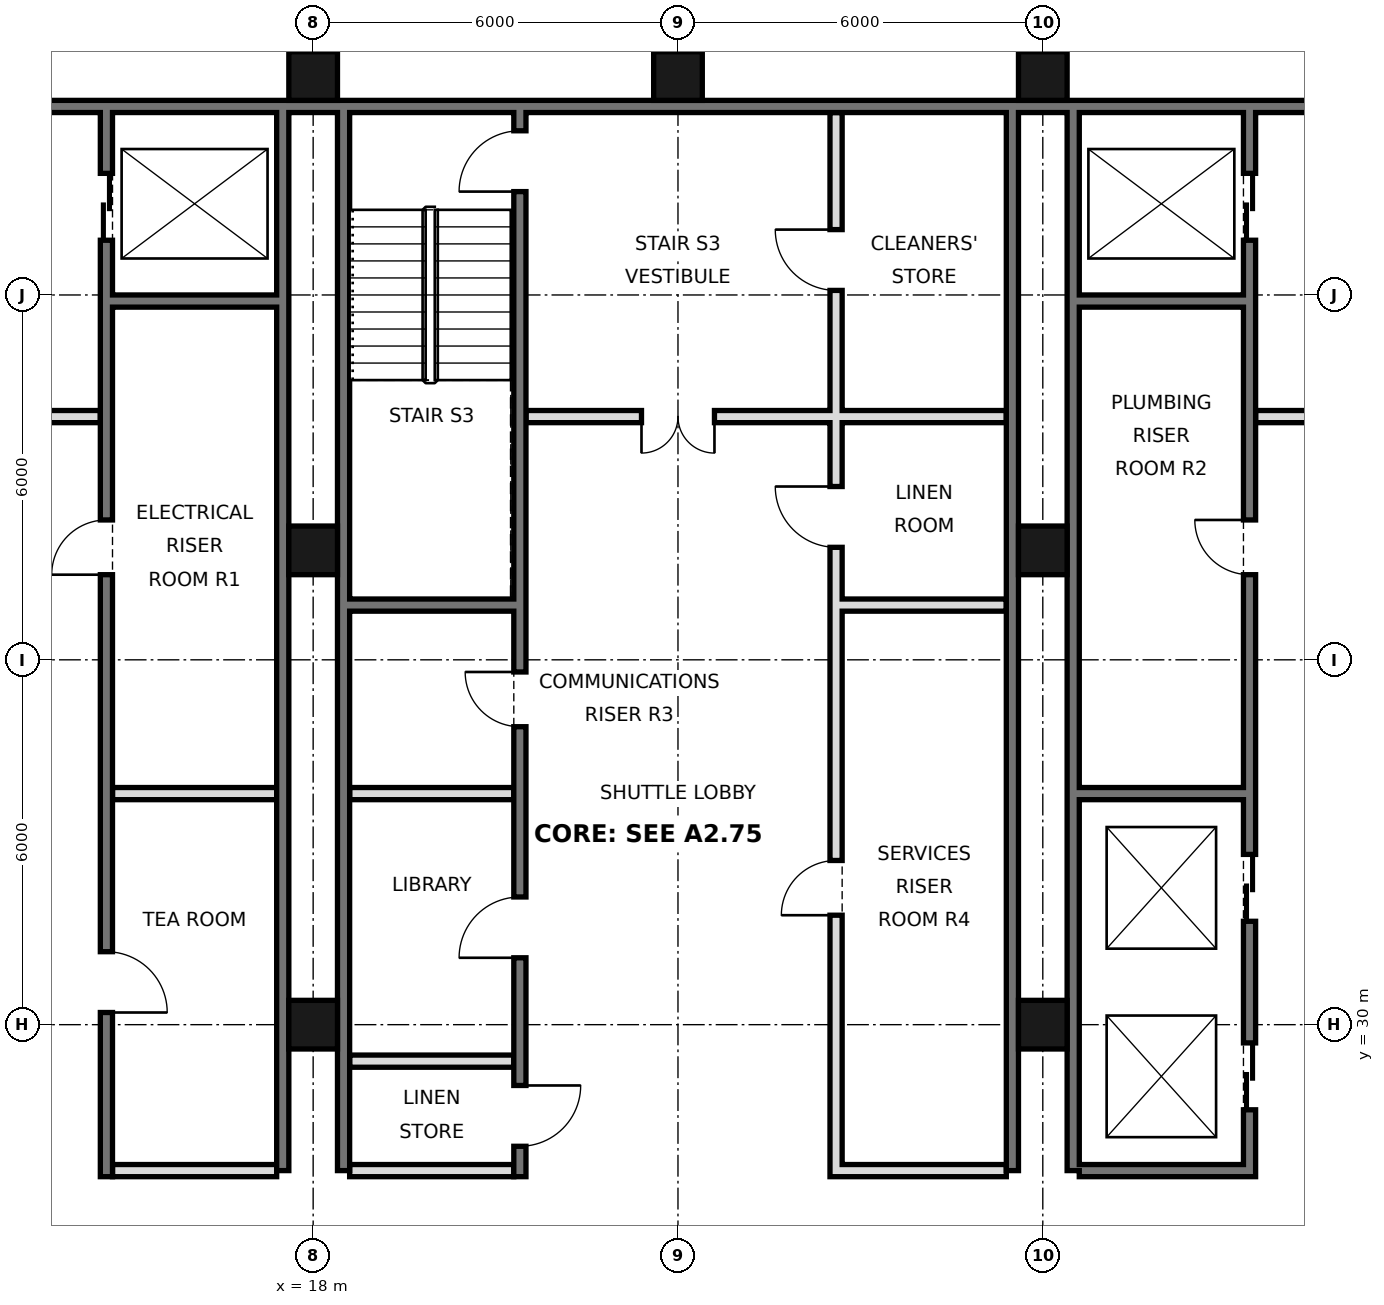
"""IFC4 building model, lengths in metres.
Left out: names, types, materials, properties, quantities, classifications, styles, units other than length and angle.
Written with IfcOpenShell. Run it as: python <this file> out.ifc"""

import sys

from ifc_helpers import new_model, si_unit, direction, frame, frame_2d, origin, origin_2d, place, context, subcontext, project, spatial, rectangle, hollow_rectangle, extrude, element, fill, save


model = new_model("IFC4")
c1 = context("Model", 3, precision=1e-05, world=origin(), true_north=direction((0.0, 1.0)))
c2 = subcontext(c1, "Body", "Model", "MODEL_VIEW")
j1 = project(units=[si_unit("LENGTHUNIT", "METRE"), si_unit("PLANEANGLEUNIT", "RADIAN")], contexts=[c1])
p1 = place(None, origin())
s1 = spatial("IfcSite", under=j1, at=p1, CompositionType="ELEMENT")
p2 = place(p1, origin())
s2 = spatial("IfcBuilding", under=s1, at=p2, CompositionType="ELEMENT")
p3 = place(p2, frame((0.0, 0.0, 301.6)))
s3 = spatial("IfcBuildingStorey", under=s2, at=p3, CompositionType="ELEMENT", Elevation=301.6)
for number, where, z_axis, x_axis in (
    (1, (18.0, 30.0, 0.0), (0.0, 0.0, 1.0), (1.0, 0.0, 0.0)),
    (2, (18.0, 37.8, 0.0), (0.0, 0.0, 1.0), (1.0, 0.0, 0.0)),
    (3, (18.0, 45.6, 0.0), (0.0, 0.0, 1.0), (1.0, 0.0, 0.0)),
    (4, (24.0, 45.6, 0.0), (0.0, 0.0, 1.0), (1.0, 0.0, 0.0)),
    (5, (30.0, 30.0, 0.0), (0.0, 0.0, 1.0), (1.0, 0.0, 0.0)),
    (6, (30.0, 37.8, 0.0), (0.0, 0.0, 1.0), (1.0, 0.0, 0.0)),
    (7, (30.0, 45.6, 0.0), (0.0, 0.0, 1.0), (1.0, 0.0, 0.0)),
):
    element("IfcColumn", number, at=place(p3, frame(where, z_axis=z_axis, x_axis=x_axis)), inside=s3, PredefinedType="COLUMN", context=c2, shape_type="SweptSolid", body=[
        extrude(hollow_rectangle(XDim=0.8, YDim=0.8, WallThickness=0.025, at=origin_2d()), origin(), (0.0, 0.0, 1.0), 3.6),
    ])
p4 = place(p3, frame((6.6, 45.1, 0.0), z_axis=(0.0, 0.0, 1.0), x_axis=(1.0, 0.0, 0.0)))
e8 = element("IfcWall", 8, at=p4, inside=s3, PredefinedType="SOLIDWALL", context=c2, shape_type="SweptSolid", body=[
    extrude(rectangle(XDim=34.8, YDim=0.2, at=frame_2d((17.4, 0.0))), origin(), (0.0, 0.0, 1.0), 3.42),
])
for number, where, z_axis, x_axis in (
    (9, (17.5, 27.6, 0.0), (0.0, 0.0, 1.0), (0.0, 1.0, 0.0)),
    (10, (18.5, 27.6, 0.0), (0.0, 0.0, 1.0), (0.0, 1.0, 0.0)),
    (11, (29.5, 27.6, 0.0), (0.0, 0.0, 1.0), (0.0, 1.0, 0.0)),
    (12, (30.5, 27.6, 0.0), (0.0, 0.0, 1.0), (0.0, 1.0, 0.0)),
):
    element("IfcWall", number, at=place(p3, frame(where, z_axis=z_axis, x_axis=x_axis)), inside=s3, PredefinedType="SOLIDWALL", context=c2, shape_type="SweptSolid", body=[
        extrude(rectangle(XDim=17.5, YDim=0.2, at=frame_2d((8.75, 0.0))), origin(), (0.0, 0.0, 1.0), 3.42),
    ])
p5 = place(p3, frame((14.6, 27.5, 0.0), z_axis=(0.0, 0.0, 1.0), x_axis=(0.0, 1.0, 0.0)))
e13 = element("IfcWall", 13, at=p5, inside=s3, PredefinedType="SOLIDWALL", context=c2, shape_type="SweptSolid", body=[
    extrude(rectangle(XDim=17.5, YDim=0.2, at=frame_2d((8.75, 0.0))), origin(), (0.0, 0.0, 1.0), 3.42),
])
p6 = place(p5, frame((15.4, 0.0, 0.0)))
e14 = element("IfcOpeningElement", 14, at=p6, cuts=e13, PredefinedType="OPENING", context=c2, shape_type="SweptSolid", body=[
    extrude(rectangle(XDim=1.1, YDim=2.1, at=frame_2d((0.55, 1.05))), frame((0.0, 0.11, 0.0), z_axis=(0.0, -1.0, 0.0), x_axis=(1.0, 0.0, 0.0)), (0.0, 0.0, 1.0), 0.22),
])
p7 = place(p5, frame((2.7, 0.0, 0.0)))
e15 = element("IfcOpeningElement", 15, at=p7, cuts=e13, PredefinedType="OPENING", context=c2, shape_type="SweptSolid", body=[
    extrude(rectangle(XDim=1.0, YDim=2.1, at=frame_2d((0.5, 1.05))), frame((0.0, 0.11, 0.0), z_axis=(0.0, -1.0, 0.0), x_axis=(1.0, 0.0, 0.0)), (0.0, 0.0, 1.0), 0.22),
])
p8 = place(p5, frame((9.9, 0.0, 0.0)))
e16 = element("IfcOpeningElement", 16, at=p8, cuts=e13, PredefinedType="OPENING", context=c2, shape_type="SweptSolid", body=[
    extrude(rectangle(XDim=0.9, YDim=2.1, at=frame_2d((0.45, 1.05))), frame((0.0, 0.11, 0.0), z_axis=(0.0, -1.0, 0.0), x_axis=(1.0, 0.0, 0.0)), (0.0, 0.0, 1.0), 0.22),
])
p9 = place(p3, frame((21.4, 27.5, 0.0), z_axis=(0.0, 0.0, 1.0), x_axis=(0.0, 1.0, 0.0)))
e17 = element("IfcWall", 17, at=p9, inside=s3, PredefinedType="SOLIDWALL", context=c2, shape_type="SweptSolid", body=[
    extrude(rectangle(XDim=17.5, YDim=0.2, at=frame_2d((8.75, 0.0))), origin(), (0.0, 0.0, 1.0), 3.42),
])
p10 = place(p9, frame((0.5, 0.0, 0.0)))
e18 = element("IfcOpeningElement", 18, at=p10, cuts=e17, PredefinedType="OPENING", context=c2, shape_type="SweptSolid", body=[
    extrude(rectangle(XDim=1.0, YDim=2.1, at=frame_2d((0.5, 1.05))), frame((0.0, 0.11, 0.0), z_axis=(0.0, -1.0, 0.0), x_axis=(1.0, 0.0, 0.0)), (0.0, 0.0, 1.0), 0.22),
])
p11 = place(p9, frame((3.6, 0.0, 0.0)))
e19 = element("IfcOpeningElement", 19, at=p11, cuts=e17, PredefinedType="OPENING", context=c2, shape_type="SweptSolid", body=[
    extrude(rectangle(XDim=1.0, YDim=2.1, at=frame_2d((0.5, 1.05))), frame((0.0, 0.11, 0.0), z_axis=(0.0, -1.0, 0.0), x_axis=(1.0, 0.0, 0.0)), (0.0, 0.0, 1.0), 0.22),
])
p12 = place(p9, frame((16.2, 0.0, 0.0)))
e20 = element("IfcOpeningElement", 20, at=p12, cuts=e17, PredefinedType="OPENING", context=c2, shape_type="SweptSolid", body=[
    extrude(rectangle(XDim=1.0, YDim=2.1, at=frame_2d((0.5, 1.05))), frame((0.0, 0.11, 0.0), z_axis=(0.0, -1.0, 0.0), x_axis=(1.0, 0.0, 0.0)), (0.0, 0.0, 1.0), 0.22),
])
p13 = place(p9, frame((7.4, 0.0, 0.0)))
e21 = element("IfcOpeningElement", 21, at=p13, cuts=e17, PredefinedType="OPENING", context=c2, shape_type="SweptSolid", body=[
    extrude(rectangle(XDim=0.9, YDim=2.1, at=frame_2d((0.45, 1.05))), frame((0.0, 0.11, 0.0), z_axis=(0.0, -1.0, 0.0), x_axis=(1.0, 0.0, 0.0)), (0.0, 0.0, 1.0), 0.22),
])
p14 = place(p3, frame((26.6, 27.5, 0.0), z_axis=(0.0, 0.0, 1.0), x_axis=(0.0, 1.0, 0.0)))
e22 = element("IfcWall", 22, at=p14, inside=s3, PredefinedType="SOLIDWALL", context=c2, shape_type="SweptSolid", body=[
    extrude(rectangle(XDim=17.5, YDim=0.2, at=frame_2d((8.75, 0.0))), origin(), (0.0, 0.0, 1.0), 3.42),
])
p15 = place(p14, frame((4.3, 0.0, 0.0)))
e23 = element("IfcOpeningElement", 23, at=p15, cuts=e22, PredefinedType="OPENING", context=c2, shape_type="SweptSolid", body=[
    extrude(rectangle(XDim=0.9, YDim=2.1, at=frame_2d((0.45, 1.05))), frame((0.0, 0.11, 0.0), z_axis=(0.0, -1.0, 0.0), x_axis=(1.0, 0.0, 0.0)), (0.0, 0.0, 1.0), 0.22),
])
p16 = place(p14, frame((10.35, 0.0, 0.0)))
e24 = element("IfcOpeningElement", 24, at=p16, cuts=e22, PredefinedType="OPENING", context=c2, shape_type="SweptSolid", body=[
    extrude(rectangle(XDim=1.0, YDim=2.1, at=frame_2d((0.5, 1.05))), frame((0.0, 0.11, 0.0), z_axis=(0.0, -1.0, 0.0), x_axis=(1.0, 0.0, 0.0)), (0.0, 0.0, 1.0), 0.22),
])
p17 = place(p14, frame((14.575, 0.0, 0.0)))
e25 = element("IfcOpeningElement", 25, at=p17, cuts=e22, PredefinedType="OPENING", context=c2, shape_type="SweptSolid", body=[
    extrude(rectangle(XDim=1.0, YDim=2.1, at=frame_2d((0.5, 1.05))), frame((0.0, 0.11, 0.0), z_axis=(0.0, -1.0, 0.0), x_axis=(1.0, 0.0, 0.0)), (0.0, 0.0, 1.0), 0.22),
])
p18 = place(p3, frame((33.4, 27.5, 0.0), z_axis=(0.0, 0.0, 1.0), x_axis=(0.0, 1.0, 0.0)))
e26 = element("IfcWall", 26, at=p18, inside=s3, PredefinedType="SOLIDWALL", context=c2, shape_type="SweptSolid", body=[
    extrude(rectangle(XDim=17.5, YDim=0.2, at=frame_2d((8.75, 0.0))), origin(), (0.0, 0.0, 1.0), 3.42),
])
p19 = place(p18, frame((1.1, 0.0, 0.0)))
e27 = element("IfcOpeningElement", 27, at=p19, cuts=e26, PredefinedType="OPENING", context=c2, shape_type="SweptSolid", body=[
    extrude(rectangle(XDim=1.1, YDim=2.1, at=frame_2d((0.55, 1.05))), frame((0.0, 0.11, 0.0), z_axis=(0.0, -1.0, 0.0), x_axis=(1.0, 0.0, 0.0)), (0.0, 0.0, 1.0), 0.22),
])
p20 = place(p18, frame((4.2, 0.0, 0.0)))
e28 = element("IfcOpeningElement", 28, at=p20, cuts=e26, PredefinedType="OPENING", context=c2, shape_type="SweptSolid", body=[
    extrude(rectangle(XDim=1.1, YDim=2.1, at=frame_2d((0.55, 1.05))), frame((0.0, 0.11, 0.0), z_axis=(0.0, -1.0, 0.0), x_axis=(1.0, 0.0, 0.0)), (0.0, 0.0, 1.0), 0.22),
])
p21 = place(p18, frame((15.4, 0.0, 0.0)))
e29 = element("IfcOpeningElement", 29, at=p21, cuts=e26, PredefinedType="OPENING", context=c2, shape_type="SweptSolid", body=[
    extrude(rectangle(XDim=1.1, YDim=2.1, at=frame_2d((0.55, 1.05))), frame((0.0, 0.11, 0.0), z_axis=(0.0, -1.0, 0.0), x_axis=(1.0, 0.0, 0.0)), (0.0, 0.0, 1.0), 0.22),
])
p22 = place(p18, frame((9.9, 0.0, 0.0)))
e30 = element("IfcOpeningElement", 30, at=p22, cuts=e26, PredefinedType="OPENING", context=c2, shape_type="SweptSolid", body=[
    extrude(rectangle(XDim=0.9, YDim=2.1, at=frame_2d((0.45, 1.05))), frame((0.0, 0.11, 0.0), z_axis=(0.0, -1.0, 0.0), x_axis=(1.0, 0.0, 0.0)), (0.0, 0.0, 1.0), 0.22),
])
for number, where, z_axis, x_axis in (
    (31, (14.7, 27.6, 0.0), (0.0, 0.0, 1.0), (1.0, 0.0, 0.0)),
    (32, (18.6, 27.6, 0.0), (0.0, 0.0, 1.0), (1.0, 0.0, 0.0)),
):
    element("IfcWall", number, at=place(p3, frame(where, z_axis=z_axis, x_axis=x_axis)), inside=s3, PredefinedType="PARTITIONING", context=c2, shape_type="SweptSolid", body=[
        extrude(rectangle(XDim=2.7, YDim=0.2, at=frame_2d((1.35, 0.0))), origin(), (0.0, 0.0, 1.0), 3.42),
    ])
for number, where, z_axis, x_axis in (
    (33, (26.7, 27.6, 0.0), (0.0, 0.0, 1.0), (1.0, 0.0, 0.0)),
    (34, (30.6, 27.6, 0.0), (0.0, 0.0, 1.0), (1.0, 0.0, 0.0)),
):
    element("IfcWall", number, at=place(p3, frame(where, z_axis=z_axis, x_axis=x_axis)), inside=s3, PredefinedType="SOLIDWALL", context=c2, shape_type="SweptSolid", body=[
        extrude(rectangle(XDim=2.7, YDim=0.2, at=frame_2d((1.35, 0.0))), origin(), (0.0, 0.0, 1.0), 3.42),
    ])
p23 = place(p3, frame((18.6, 29.4, 0.0), z_axis=(0.0, 0.0, 1.0), x_axis=(1.0, 0.0, 0.0)))
e35 = element("IfcWall", 35, at=p23, inside=s3, PredefinedType="PARTITIONING", context=c2, shape_type="SweptSolid", body=[
    extrude(rectangle(XDim=2.7, YDim=0.2, at=frame_2d((1.35, 0.0))), origin(), (0.0, 0.0, 1.0), 3.42),
])
for number, where, z_axis, x_axis in (
    (36, (14.7, 33.8, 0.0), (0.0, 0.0, 1.0), (1.0, 0.0, 0.0)),
    (37, (18.6, 33.8, 0.0), (0.0, 0.0, 1.0), (1.0, 0.0, 0.0)),
    (38, (30.6, 33.8, 0.0), (0.0, 0.0, 1.0), (1.0, 0.0, 0.0)),
    (39, (18.6, 36.9, 0.0), (0.0, 0.0, 1.0), (1.0, 0.0, 0.0)),
    (40, (26.7, 36.9, 0.0), (0.0, 0.0, 1.0), (1.0, 0.0, 0.0)),
):
    element("IfcWall", number, at=place(p3, frame(where, z_axis=z_axis, x_axis=x_axis)), inside=s3, PredefinedType="SOLIDWALL", context=c2, shape_type="SweptSolid", body=[
        extrude(rectangle(XDim=2.7, YDim=0.2, at=frame_2d((1.35, 0.0))), origin(), (0.0, 0.0, 1.0), 3.42),
    ])
p24 = place(p3, frame((21.5, 40.0, 0.0), z_axis=(0.0, 0.0, 1.0), x_axis=(1.0, 0.0, 0.0)))
e41 = element("IfcWall", 41, at=p24, inside=s3, PredefinedType="PARTITIONING", context=c2, shape_type="SweptSolid", body=[
    extrude(rectangle(XDim=7.9, YDim=0.2, at=frame_2d((3.95, 0.0))), origin(), (0.0, 0.0, 1.0), 3.42),
])
p25 = place(p24, frame((1.9, 0.0, 0.0)))
e42 = element("IfcOpeningElement", 42, at=p25, cuts=e41, PredefinedType="OPENING", context=c2, shape_type="SweptSolid", body=[
    extrude(rectangle(XDim=1.2, YDim=2.1, at=frame_2d((0.6, 1.05))), frame((0.0, 0.11, 0.0), z_axis=(0.0, -1.0, 0.0), x_axis=(1.0, 0.0, 0.0)), (0.0, 0.0, 1.0), 0.22),
])
p26 = place(p3, frame((33.5, 40.0, 0.0), z_axis=(0.0, 0.0, 1.0), x_axis=(1.0, 0.0, 0.0)))
e43 = element("IfcWall", 43, at=p26, inside=s3, PredefinedType="PARTITIONING", context=c2, shape_type="SweptSolid", body=[
    extrude(rectangle(XDim=5.0, YDim=0.2, at=frame_2d((2.5, 0.0))), origin(), (0.0, 0.0, 1.0), 3.42),
])
p27 = place(p26, frame((1.9, 0.0, 0.0)))
e44 = element("IfcOpeningElement", 44, at=p27, cuts=e43, PredefinedType="OPENING", context=c2, shape_type="SweptSolid", body=[
    extrude(rectangle(XDim=1.2, YDim=2.1, at=frame_2d((0.6, 1.05))), frame((0.0, 0.11, 0.0), z_axis=(0.0, -1.0, 0.0), x_axis=(1.0, 0.0, 0.0)), (0.0, 0.0, 1.0), 0.22),
])
p28 = place(p3, frame((9.5, 40.0, 0.0), z_axis=(0.0, 0.0, 1.0), x_axis=(1.0, 0.0, 0.0)))
e45 = element("IfcWall", 45, at=p28, inside=s3, PredefinedType="PARTITIONING", context=c2, shape_type="SweptSolid", body=[
    extrude(rectangle(XDim=5.0, YDim=0.2, at=frame_2d((2.5, 0.0))), origin(), (0.0, 0.0, 1.0), 3.42),
])
p29 = place(p28, frame((1.9, 0.0, 0.0)))
e46 = element("IfcOpeningElement", 46, at=p29, cuts=e45, PredefinedType="OPENING", context=c2, shape_type="SweptSolid", body=[
    extrude(rectangle(XDim=1.2, YDim=2.1, at=frame_2d((0.6, 1.05))), frame((0.0, 0.11, 0.0), z_axis=(0.0, -1.0, 0.0), x_axis=(1.0, 0.0, 0.0)), (0.0, 0.0, 1.0), 0.22),
])
for number, where, z_axis, x_axis in (
    (47, (14.7, 41.9, 0.0), (0.0, 0.0, 1.0), (1.0, 0.0, 0.0)),
    (48, (30.6, 41.9, 0.0), (0.0, 0.0, 1.0), (1.0, 0.0, 0.0)),
):
    element("IfcWall", number, at=place(p3, frame(where, z_axis=z_axis, x_axis=x_axis)), inside=s3, PredefinedType="SOLIDWALL", context=c2, shape_type="SweptSolid", body=[
        extrude(rectangle(XDim=2.7, YDim=0.2, at=frame_2d((1.35, 0.0))), origin(), (0.0, 0.0, 1.0), 3.42),
    ])
p30 = place(p25, frame((1.2, 0.0, 0.0), z_axis=(0.0, 0.0, 1.0), x_axis=(-1.0, 0.0, 0.0)))
e49 = element("IfcDoor", 49, at=p30, inside=s3, OperationType="DOUBLE_DOOR_SINGLE_SWING", PredefinedType="DOOR", context=c2, shape_type="SweptSolid", body=[
    extrude(rectangle(XDim=1.2, YDim=2.1, at=frame_2d((0.6, 1.05))), frame((0.0, 0.025, 0.0), z_axis=(0.0, -1.0, 0.0), x_axis=(1.0, 0.0, 0.0)), (0.0, 0.0, 1.0), 0.05),
])
fill(e42, e49)
p31 = place(p19, origin())
e50 = element("IfcDoor", 50, at=p31, inside=s3, OperationType="DOUBLE_DOOR_SLIDING", PredefinedType="DOOR", context=c2, shape_type="SweptSolid", body=[
    extrude(rectangle(XDim=1.1, YDim=2.1, at=frame_2d((0.55, 1.05))), frame((0.0, 0.025, 0.0), z_axis=(0.0, -1.0, 0.0), x_axis=(1.0, 0.0, 0.0)), (0.0, 0.0, 1.0), 0.05),
])
fill(e27, e50)
p32 = place(p20, origin())
e51 = element("IfcDoor", 51, at=p32, inside=s3, OperationType="DOUBLE_DOOR_SLIDING", PredefinedType="DOOR", context=c2, shape_type="SweptSolid", body=[
    extrude(rectangle(XDim=1.1, YDim=2.1, at=frame_2d((0.55, 1.05))), frame((0.0, 0.025, 0.0), z_axis=(0.0, -1.0, 0.0), x_axis=(1.0, 0.0, 0.0)), (0.0, 0.0, 1.0), 0.05),
])
fill(e28, e51)
p33 = place(p21, origin())
e52 = element("IfcDoor", 52, at=p33, inside=s3, OperationType="DOUBLE_DOOR_SLIDING", PredefinedType="DOOR", context=c2, shape_type="SweptSolid", body=[
    extrude(rectangle(XDim=1.1, YDim=2.1, at=frame_2d((0.55, 1.05))), frame((0.0, 0.025, 0.0), z_axis=(0.0, -1.0, 0.0), x_axis=(1.0, 0.0, 0.0)), (0.0, 0.0, 1.0), 0.05),
])
fill(e29, e52)
p34 = place(p6, origin())
e53 = element("IfcDoor", 53, at=p34, inside=s3, OperationType="DOUBLE_DOOR_SLIDING", PredefinedType="DOOR", context=c2, shape_type="SweptSolid", body=[
    extrude(rectangle(XDim=1.1, YDim=2.1, at=frame_2d((0.55, 1.05))), frame((0.0, 0.025, 0.0), z_axis=(0.0, -1.0, 0.0), x_axis=(1.0, 0.0, 0.0)), (0.0, 0.0, 1.0), 0.05),
])
fill(e14, e53)
p35 = place(p10, origin())
e54 = element("IfcDoor", 54, at=p35, inside=s3, OperationType="SINGLE_SWING_RIGHT", PredefinedType="DOOR", context=c2, shape_type="SweptSolid", body=[
    extrude(rectangle(XDim=1.0, YDim=2.1, at=frame_2d((0.5, 1.05))), frame((0.0, 0.025, 0.0), z_axis=(0.0, -1.0, 0.0), x_axis=(1.0, 0.0, 0.0)), (0.0, 0.0, 1.0), 0.05),
])
fill(e18, e54)
p36 = place(p11, origin())
e55 = element("IfcDoor", 55, at=p36, inside=s3, OperationType="SINGLE_SWING_LEFT", PredefinedType="DOOR", context=c2, shape_type="SweptSolid", body=[
    extrude(rectangle(XDim=1.0, YDim=2.1, at=frame_2d((0.5, 1.05))), frame((0.0, 0.025, 0.0), z_axis=(0.0, -1.0, 0.0), x_axis=(1.0, 0.0, 0.0)), (0.0, 0.0, 1.0), 0.05),
])
fill(e19, e55)
p37 = place(p7, frame((1.0, 0.0, 0.0), z_axis=(0.0, 0.0, 1.0), x_axis=(-1.0, 0.0, 0.0)))
e56 = element("IfcDoor", 56, at=p37, inside=s3, OperationType="SINGLE_SWING_RIGHT", PredefinedType="DOOR", context=c2, shape_type="SweptSolid", body=[
    extrude(rectangle(XDim=1.0, YDim=2.1, at=frame_2d((0.5, 1.05))), frame((0.0, 0.025, 0.0), z_axis=(0.0, -1.0, 0.0), x_axis=(1.0, 0.0, 0.0)), (0.0, 0.0, 1.0), 0.05),
])
fill(e15, e56)
p38 = place(p12, origin())
e57 = element("IfcDoor", 57, at=p38, inside=s3, OperationType="SINGLE_SWING_LEFT", PredefinedType="DOOR", context=c2, shape_type="SweptSolid", body=[
    extrude(rectangle(XDim=1.0, YDim=2.1, at=frame_2d((0.5, 1.05))), frame((0.0, 0.025, 0.0), z_axis=(0.0, -1.0, 0.0), x_axis=(1.0, 0.0, 0.0)), (0.0, 0.0, 1.0), 0.05),
])
fill(e20, e57)
p39 = place(p8, origin())
e58 = element("IfcDoor", 58, at=p39, inside=s3, OperationType="SINGLE_SWING_LEFT", PredefinedType="DOOR", context=c2, shape_type="SweptSolid", body=[
    extrude(rectangle(XDim=0.9, YDim=2.1, at=frame_2d((0.45, 1.05))), frame((0.0, 0.025, 0.0), z_axis=(0.0, -1.0, 0.0), x_axis=(1.0, 0.0, 0.0)), (0.0, 0.0, 1.0), 0.05),
])
fill(e16, e58)
p40 = place(p22, frame((0.9, 0.0, 0.0), z_axis=(0.0, 0.0, 1.0), x_axis=(-1.0, 0.0, 0.0)))
e59 = element("IfcDoor", 59, at=p40, inside=s3, OperationType="SINGLE_SWING_LEFT", PredefinedType="DOOR", context=c2, shape_type="SweptSolid", body=[
    extrude(rectangle(XDim=0.9, YDim=2.1, at=frame_2d((0.45, 1.05))), frame((0.0, 0.025, 0.0), z_axis=(0.0, -1.0, 0.0), x_axis=(1.0, 0.0, 0.0)), (0.0, 0.0, 1.0), 0.05),
])
fill(e30, e59)
p41 = place(p13, frame((0.9, 0.0, 0.0), z_axis=(0.0, 0.0, 1.0), x_axis=(-1.0, 0.0, 0.0)))
e60 = element("IfcDoor", 60, at=p41, inside=s3, OperationType="SINGLE_SWING_LEFT", PredefinedType="DOOR", context=c2, shape_type="SweptSolid", body=[
    extrude(rectangle(XDim=0.9, YDim=2.1, at=frame_2d((0.45, 1.05))), frame((0.0, 0.025, 0.0), z_axis=(0.0, -1.0, 0.0), x_axis=(1.0, 0.0, 0.0)), (0.0, 0.0, 1.0), 0.05),
])
fill(e21, e60)
p42 = place(p15, origin())
e61 = element("IfcDoor", 61, at=p42, inside=s3, OperationType="SINGLE_SWING_LEFT", PredefinedType="DOOR", context=c2, shape_type="SweptSolid", body=[
    extrude(rectangle(XDim=0.9, YDim=2.1, at=frame_2d((0.45, 1.05))), frame((0.0, 0.025, 0.0), z_axis=(0.0, -1.0, 0.0), x_axis=(1.0, 0.0, 0.0)), (0.0, 0.0, 1.0), 0.05),
])
fill(e23, e61)
p43 = place(p16, frame((1.0, 0.0, 0.0), z_axis=(0.0, 0.0, 1.0), x_axis=(-1.0, 0.0, 0.0)))
e62 = element("IfcDoor", 62, at=p43, inside=s3, OperationType="SINGLE_SWING_LEFT", PredefinedType="DOOR", context=c2, shape_type="SweptSolid", body=[
    extrude(rectangle(XDim=1.0, YDim=2.1, at=frame_2d((0.5, 1.05))), frame((0.0, 0.025, 0.0), z_axis=(0.0, -1.0, 0.0), x_axis=(1.0, 0.0, 0.0)), (0.0, 0.0, 1.0), 0.05),
])
fill(e24, e62)
p44 = place(p17, frame((1.0, 0.0, 0.0), z_axis=(0.0, 0.0, 1.0), x_axis=(-1.0, 0.0, 0.0)))
e63 = element("IfcDoor", 63, at=p44, inside=s3, OperationType="SINGLE_SWING_LEFT", PredefinedType="DOOR", context=c2, shape_type="SweptSolid", body=[
    extrude(rectangle(XDim=1.0, YDim=2.1, at=frame_2d((0.5, 1.05))), frame((0.0, 0.025, 0.0), z_axis=(0.0, -1.0, 0.0), x_axis=(1.0, 0.0, 0.0)), (0.0, 0.0, 1.0), 0.05),
])
fill(e25, e63)
save(model, sys.argv[1])
